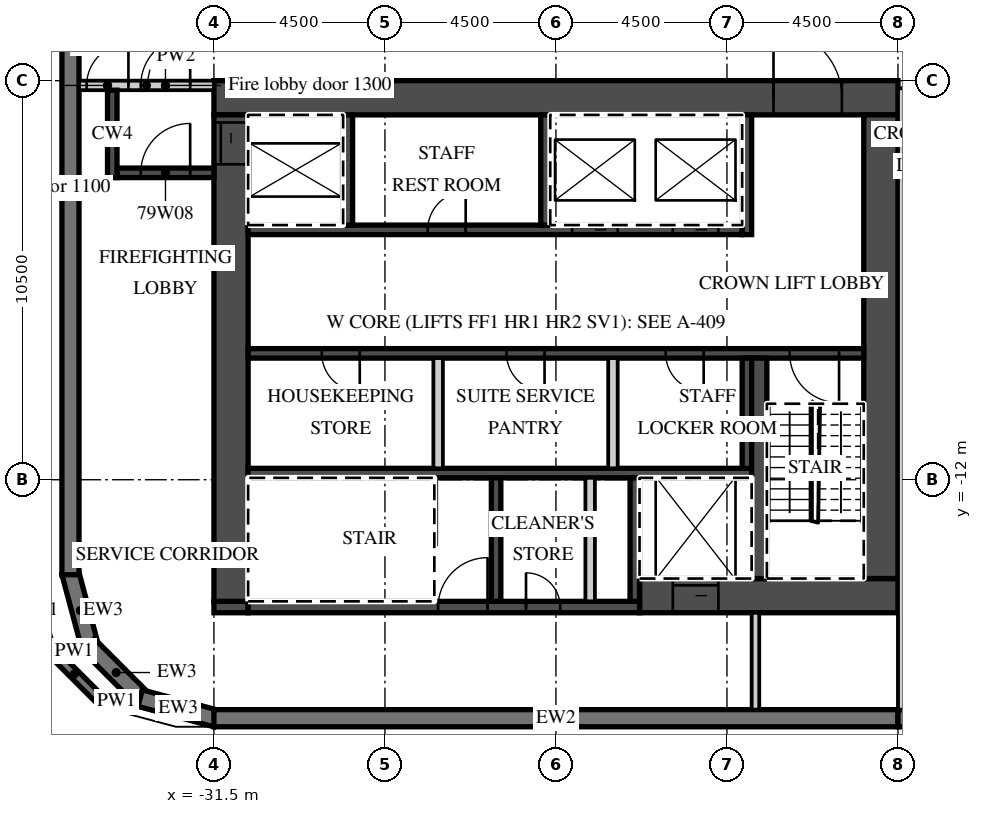
"""IFC4 building model, lengths in metres.
Left out: names, types, materials, properties, quantities, classifications, styles, units other than length and angle.
Written with IfcOpenShell. Run it as: python <this file> out.ifc"""

import sys

from ifc_helpers import new_model, si_unit, direction, frame, frame_2d, origin, place, context, subcontext, project, spatial, polyline, rectangle, outline, extrude, element, fill, save


model = new_model("IFC4")
c1 = context("Model", 3, precision=1e-05, world=origin(), true_north=direction((0.0, 1.0)))
c2 = subcontext(c1, "Body", "Model", "MODEL_VIEW")
j1 = project(units=[si_unit("LENGTHUNIT", "METRE"), si_unit("PLANEANGLEUNIT", "RADIAN")], contexts=[c1])
p1 = place(None, origin())
s1 = spatial("IfcSite", under=j1, at=p1, CompositionType="ELEMENT")
p2 = place(p1, origin())
s2 = spatial("IfcBuilding", under=s1, at=p2, CompositionType="ELEMENT")
p3 = place(p2, frame((0.0, 0.0, 313.6)))
s3 = spatial("IfcBuildingStorey", under=s2, at=p3, CompositionType="ELEMENT", Elevation=313.6)
p4 = place(p3, frame((-35.283, -14.442, 0.0), z_axis=(0.0, 0.0, 1.0), x_axis=(0.25881466832, -0.965926999034, 0.0)))
e1 = element("IfcWall", 1, at=p4, inside=s3, PredefinedType="SOLIDWALL", context=c2, shape_type="SweptSolid", body=[
    extrude(outline(polyline([(0.0, -0.225), (2.071, -0.225), (1.95, 0.225), (0.121, 0.225), (0.0, -0.225)])), origin(), (0.0, 0.0, 1.0), 3.8),
])
p5 = place(p3, frame((-34.805, -16.341, 0.0), z_axis=(0.0, 0.0, 1.0), x_axis=(0.707106781187, -0.707106781187, 0.0)))
e2 = element("IfcWall", 2, at=p5, inside=s3, PredefinedType="SOLIDWALL", context=c2, shape_type="SweptSolid", body=[
    extrude(outline(polyline([(0.0, -0.225), (2.071, -0.225), (1.95, 0.225), (0.121, 0.225), (0.0, -0.225)])), origin(), (0.0, 0.0, 1.0), 3.8),
])
p6 = place(p3, frame((-33.442, -17.747, 0.0), z_axis=(0.0, 0.0, 1.0), x_axis=(0.965926999034, -0.25881466832, 0.0)))
e3 = element("IfcWall", 3, at=p6, inside=s3, PredefinedType="SOLIDWALL", context=c2, shape_type="SweptSolid", body=[
    extrude(outline(polyline([(-0.0, -0.225), (2.07, -0.225), (1.95, 0.225), (0.12, 0.225), (-0.0, -0.225)])), origin(), (0.0, 0.0, 1.0), 3.8),
])
p7 = place(p3, frame((-31.5, -18.275, 0.0), z_axis=(0.0, 0.0, 1.0), x_axis=(1.0, 0.0, 0.0)))
e4 = element("IfcWall", 4, at=p7, inside=s3, PredefinedType="SOLIDWALL", context=c2, shape_type="SweptSolid", body=[
    extrude(rectangle(XDim=18.0, YDim=0.45, at=frame_2d((9.0, 0.0))), origin(), (0.0, 0.0, 1.0), 3.8),
])
p8 = place(p3, frame((-13.5, -18.275, 0.0), z_axis=(0.0, 0.0, 1.0), x_axis=(1.0, 0.0, 0.0)))
e5 = element("IfcWall", 5, at=p8, inside=s3, PredefinedType="SOLIDWALL", context=c2, shape_type="SweptSolid", body=[
    extrude(rectangle(XDim=46.0, YDim=0.45, at=frame_2d((23.0, 0.0))), origin(), (0.0, 0.0, 1.0), 3.8),
])
p9 = place(p3, frame((-35.275, 13.5, 0.0), z_axis=(0.0, 0.0, 1.0), x_axis=(0.0, -1.0, 0.0)))
e6 = element("IfcWall", 6, at=p9, inside=s3, PredefinedType="SOLIDWALL", context=c2, shape_type="SweptSolid", body=[
    extrude(rectangle(XDim=28.0, YDim=0.45, at=frame_2d((14.0, 0.0))), origin(), (0.0, 0.0, 1.0), 3.8),
])
p10 = place(p3, origin())
e7 = element("IfcWall", 7, at=p10, inside=s3, PredefinedType="PARAPET", context=c2, shape_type="SweptSolid", body=[
    extrude(outline(polyline([(-33.642, -17.941), (-33.647, -17.818), (-33.769, -17.697), (-34.386, -17.725), (-34.485, -17.979), (-33.642, -17.941)])), origin(), (0.0, 0.0, 1.0), 1.1),
])
p11 = place(p3, origin())
e8 = element("IfcWall", 8, at=p11, inside=s3, PredefinedType="PARAPET", context=c2, shape_type="SweptSolid", body=[
    extrude(outline(polyline([(-34.485, -17.979), (-34.386, -17.725), (-35.74, -16.371), (-35.964, -16.5), (-34.485, -17.979)])), origin(), (0.0, 0.0, 1.0), 1.1),
])
p12 = place(p3, origin())
e9 = element("IfcWall", 9, at=p12, inside=s3, PredefinedType="PARAPET", context=c2, shape_type="SweptSolid", body=[
    extrude(outline(polyline([(-35.964, -16.5), (-35.74, -16.371), (-36.25, -14.467), (-36.5, -14.5), (-35.964, -16.5)])), origin(), (0.0, 0.0, 1.0), 1.1),
])
p13 = place(p3, frame((-31.5, -1.95, 0.0), z_axis=(0.0, 0.0, 1.0), x_axis=(1.0, 0.0, 0.0)))
e10 = element("IfcWall", 10, at=p13, inside=s3, PredefinedType="SHEAR", context=c2, shape_type="SweptSolid", body=[
    extrude(rectangle(XDim=18.0, YDim=0.9, at=frame_2d((9.0, 0.0))), origin(), (0.0, 0.0, 1.0), 3.8),
])
p14 = place(p13, frame((14.725, 0.0, 0.0)))
e11 = element("IfcOpeningElement", 11, at=p14, cuts=e10, PredefinedType="OPENING", context=c2, shape_type="SweptSolid", body=[
    extrude(rectangle(XDim=1.8, YDim=2.1, at=frame_2d((0.9, 1.05))), frame((0.0, 0.46, 0.0), z_axis=(0.0, -1.0, 0.0), x_axis=(1.0, 0.0, 0.0)), (0.0, 0.0, 1.0), 0.92),
])
p15 = place(p3, frame((-20.3, -15.05, 0.0), z_axis=(0.0, 0.0, 1.0), x_axis=(1.0, 0.0, 0.0)))
e12 = element("IfcWall", 12, at=p15, inside=s3, PredefinedType="SHEAR", context=c2, shape_type="SweptSolid", body=[
    extrude(rectangle(XDim=6.8, YDim=0.9, at=frame_2d((3.4, 0.0))), origin(), (0.0, 0.0, 1.0), 3.8),
])
p16 = place(p15, frame((0.875, 0.0, 0.0)))
e13 = element("IfcOpeningElement", 13, at=p16, cuts=e12, PredefinedType="OPENING", context=c2, shape_type="SweptSolid", body=[
    extrude(rectangle(XDim=1.2, YDim=2.1, at=frame_2d((0.6, 1.05))), frame((0.0, 0.46, 0.0), z_axis=(0.0, -1.0, 0.0), x_axis=(1.0, 0.0, 0.0)), (0.0, 0.0, 1.0), 0.92),
])
p17 = place(p3, frame((-31.5, -15.35, 0.0), z_axis=(0.0, 0.0, 1.0), x_axis=(1.0, 0.0, 0.0)))
e14 = element("IfcWall", 14, at=p17, inside=s3, PredefinedType="SHEAR", context=c2, shape_type="SweptSolid", body=[
    extrude(rectangle(XDim=0.9, YDim=0.3, at=frame_2d((0.45, 0.0))), origin(), (0.0, 0.0, 1.0), 3.8),
])
p18 = place(p3, frame((-30.6, -15.35, 0.0), z_axis=(0.0, 0.0, 1.0), x_axis=(1.0, 0.0, 0.0)))
e15 = element("IfcWall", 15, at=p18, inside=s3, PredefinedType="SHEAR", context=c2, shape_type="SweptSolid", body=[
    extrude(rectangle(XDim=10.3, YDim=0.3, at=frame_2d((5.15, 0.0))), origin(), (0.0, 0.0, 1.0), 3.8),
])
p19 = place(p18, frame((5.0, 0.0, 0.0)))
e16 = element("IfcOpeningElement", 16, at=p19, cuts=e15, PredefinedType="OPENING", context=c2, shape_type="SweptSolid", body=[
    extrude(rectangle(XDim=1.3, YDim=2.1, at=frame_2d((0.65, 1.05))), frame((0.0, 0.16, 0.0), z_axis=(0.0, -1.0, 0.0), x_axis=(1.0, 0.0, 0.0)), (0.0, 0.0, 1.0), 0.32),
])
p20 = place(p18, frame((7.312, 0.0, 0.0)))
e17 = element("IfcOpeningElement", 17, at=p20, cuts=e15, PredefinedType="OPENING", context=c2, shape_type="SweptSolid", body=[
    extrude(rectangle(XDim=0.9, YDim=2.1, at=frame_2d((0.45, 1.05))), frame((0.0, 0.16, 0.0), z_axis=(0.0, -1.0, 0.0), x_axis=(1.0, 0.0, 0.0)), (0.0, 0.0, 1.0), 0.32),
])
p21 = place(p3, frame((-31.05, -15.2, 0.0), z_axis=(0.0, 0.0, 1.0), x_axis=(0.0, 1.0, 0.0)))
e18 = element("IfcWall", 18, at=p21, inside=s3, PredefinedType="SHEAR", context=c2, shape_type="SweptSolid", body=[
    extrude(rectangle(XDim=12.8, YDim=0.9, at=frame_2d((6.4, 0.0))), origin(), (0.0, 0.0, 1.0), 3.8),
])
p22 = place(p21, frame((11.5, 0.0, 0.0)))
e19 = element("IfcOpeningElement", 19, at=p22, cuts=e18, PredefinedType="OPENING", context=c2, shape_type="SweptSolid", body=[
    extrude(rectangle(XDim=1.1, YDim=2.1, at=frame_2d((0.55, 1.05))), frame((0.0, 0.46, 0.0), z_axis=(0.0, -1.0, 0.0), x_axis=(1.0, 0.0, 0.0)), (0.0, 0.0, 1.0), 0.92),
])
p23 = place(p3, frame((-13.95, -14.6, 0.0), z_axis=(0.0, 0.0, 1.0), x_axis=(0.0, 1.0, 0.0)))
e20 = element("IfcWall", 20, at=p23, inside=s3, PredefinedType="SHEAR", context=c2, shape_type="SweptSolid", body=[
    extrude(rectangle(XDim=12.2, YDim=0.9, at=frame_2d((6.1, 0.0))), origin(), (0.0, 0.0, 1.0), 3.8),
])
p24 = place(p3, frame((-30.6, -5.425, 0.0), z_axis=(0.0, 0.0, 1.0), x_axis=(1.0, 0.0, 0.0)))
e21 = element("IfcWall", 21, at=p24, inside=s3, PredefinedType="SHEAR", context=c2, shape_type="SweptSolid", body=[
    extrude(rectangle(XDim=13.0, YDim=0.25, at=frame_2d((6.5, 0.0))), origin(), (0.0, 0.0, 1.0), 3.8),
])
p25 = place(p24, frame((8.525, 0.0, 0.0)))
e22 = element("IfcOpeningElement", 22, at=p25, cuts=e21, PredefinedType="OPENING", context=c2, shape_type="SweptSolid", body=[
    extrude(rectangle(XDim=1.2, YDim=2.1, at=frame_2d((0.6, 1.05))), frame((0.0, 0.135, 0.0), z_axis=(0.0, -1.0, 0.0), x_axis=(1.0, 0.0, 0.0)), (0.0, 0.0, 1.0), 0.27),
])
p26 = place(p24, frame((11.175, 0.0, 0.0)))
e23 = element("IfcOpeningElement", 23, at=p26, cuts=e21, PredefinedType="OPENING", context=c2, shape_type="SweptSolid", body=[
    extrude(rectangle(XDim=1.2, YDim=2.1, at=frame_2d((0.6, 1.05))), frame((0.0, 0.135, 0.0), z_axis=(0.0, -1.0, 0.0), x_axis=(1.0, 0.0, 0.0)), (0.0, 0.0, 1.0), 0.27),
])
p27 = place(p24, frame((4.725, 0.0, 0.0)))
e24 = element("IfcOpeningElement", 24, at=p27, cuts=e21, PredefinedType="OPENING", context=c2, shape_type="SweptSolid", body=[
    extrude(rectangle(XDim=1.0, YDim=2.1, at=frame_2d((0.5, 1.05))), frame((0.0, 0.135, 0.0), z_axis=(0.0, -1.0, 0.0), x_axis=(1.0, 0.0, 0.0)), (0.0, 0.0, 1.0), 0.27),
])
p28 = place(p3, frame((-17.475, -5.55, 0.0), z_axis=(0.0, 0.0, 1.0), x_axis=(0.0, 1.0, 0.0)))
e25 = element("IfcWall", 25, at=p28, inside=s3, PredefinedType="SHEAR", context=c2, shape_type="SweptSolid", body=[
    extrude(rectangle(XDim=3.15, YDim=0.25, at=frame_2d((1.575, 0.0))), origin(), (0.0, 0.0, 1.0), 3.8),
])
for number, where, z_axis, x_axis in (
    (26, (-27.975, -5.3, 0.0), (0.0, 0.0, 1.0), (0.0, 1.0, 0.0)),
    (27, (-22.775, -5.3, 0.0), (0.0, 0.0, 1.0), (0.0, 1.0, 0.0)),
):
    element("IfcWall", number, at=place(p3, frame(where, z_axis=z_axis, x_axis=x_axis)), inside=s3, PredefinedType="SHEAR", context=c2, shape_type="SweptSolid", body=[
        extrude(rectangle(XDim=2.9, YDim=0.25, at=frame_2d((1.45, 0.0))), origin(), (0.0, 0.0, 1.0), 3.8),
    ])
p29 = place(p3, frame((-30.6, -8.675, 0.0), z_axis=(0.0, 0.0, 1.0), x_axis=(1.0, 0.0, 0.0)))
e28 = element("IfcWall", 28, at=p29, inside=s3, PredefinedType="SHEAR", context=c2, shape_type="SweptSolid", body=[
    extrude(rectangle(XDim=16.2, YDim=0.25, at=frame_2d((8.1, 0.0))), origin(), (0.0, 0.0, 1.0), 3.8),
])
p30 = place(p29, frame((14.25, 0.0, 0.0)))
e29 = element("IfcOpeningElement", 29, at=p30, cuts=e28, PredefinedType="OPENING", context=c2, shape_type="SweptSolid", body=[
    extrude(rectangle(XDim=1.3, YDim=2.1, at=frame_2d((0.65, 1.05))), frame((0.0, 0.135, 0.0), z_axis=(0.0, -1.0, 0.0), x_axis=(1.0, 0.0, 0.0)), (0.0, 0.0, 1.0), 0.27),
])
p31 = place(p29, frame((1.938, 0.0, 0.0)))
e30 = element("IfcOpeningElement", 30, at=p31, cuts=e28, PredefinedType="OPENING", context=c2, shape_type="SweptSolid", body=[
    extrude(rectangle(XDim=1.0, YDim=2.1, at=frame_2d((0.5, 1.05))), frame((0.0, 0.135, 0.0), z_axis=(0.0, -1.0, 0.0), x_axis=(1.0, 0.0, 0.0)), (0.0, 0.0, 1.0), 0.27),
])
p32 = place(p29, frame((6.8, 0.0, 0.0)))
e31 = element("IfcOpeningElement", 31, at=p32, cuts=e28, PredefinedType="OPENING", context=c2, shape_type="SweptSolid", body=[
    extrude(rectangle(XDim=1.0, YDim=2.1, at=frame_2d((0.5, 1.05))), frame((0.0, 0.135, 0.0), z_axis=(0.0, -1.0, 0.0), x_axis=(1.0, 0.0, 0.0)), (0.0, 0.0, 1.0), 0.27),
])
p33 = place(p29, frame((10.988, 0.0, 0.0)))
e32 = element("IfcOpeningElement", 32, at=p33, cuts=e28, PredefinedType="OPENING", context=c2, shape_type="SweptSolid", body=[
    extrude(rectangle(XDim=1.0, YDim=2.1, at=frame_2d((0.5, 1.05))), frame((0.0, 0.135, 0.0), z_axis=(0.0, -1.0, 0.0), x_axis=(1.0, 0.0, 0.0)), (0.0, 0.0, 1.0), 0.27),
])
p34 = place(p3, frame((-30.6, -11.825, 0.0), z_axis=(0.0, 0.0, 1.0), x_axis=(1.0, 0.0, 0.0)))
e33 = element("IfcWall", 33, at=p34, inside=s3, PredefinedType="SHEAR", context=c2, shape_type="SweptSolid", body=[
    extrude(rectangle(XDim=13.25, YDim=0.25, at=frame_2d((6.625, 0.0))), origin(), (0.0, 0.0, 1.0), 3.8),
])
p35 = place(p3, frame((-17.475, -11.7, 0.0), z_axis=(0.0, 0.0, 1.0), x_axis=(0.0, 1.0, 0.0)))
e34 = element("IfcWall", 34, at=p35, inside=s3, PredefinedType="SHEAR", context=c2, shape_type="SweptSolid", body=[
    extrude(rectangle(XDim=2.9, YDim=0.25, at=frame_2d((1.45, 0.0))), origin(), (0.0, 0.0, 1.0), 3.8),
])
for number, where, z_axis, x_axis in (
    (35, (-25.6, -11.7, 0.0), (0.0, 0.0, 1.0), (0.0, 1.0, 0.0)),
    (36, (-21.0, -11.7, 0.0), (0.0, 0.0, 1.0), (0.0, 1.0, 0.0)),
):
    element("IfcWall", number, at=place(p3, frame(where, z_axis=z_axis, x_axis=x_axis)), inside=s3, PredefinedType="PARTITIONING", context=c2, shape_type="SweptSolid", body=[
        extrude(rectangle(XDim=2.9, YDim=0.25, at=frame_2d((1.45, 0.0))), origin(), (0.0, 0.0, 1.0), 3.8),
    ])
p36 = place(p3, frame((-17.15, -14.6, 0.0), z_axis=(0.0, 0.0, 1.0), x_axis=(0.0, 1.0, 0.0)))
e37 = element("IfcWall", 37, at=p36, inside=s3, PredefinedType="SHEAR", context=c2, shape_type="SweptSolid", body=[
    extrude(rectangle(XDim=5.8, YDim=0.4, at=frame_2d((2.9, 0.0))), origin(), (0.0, 0.0, 1.0), 3.8),
])
for number, where, z_axis, x_axis in (
    (38, (-20.425, -15.2, 0.0), (0.0, 0.0, 1.0), (0.0, 1.0, 0.0)),
    (39, (-24.075, -15.2, 0.0), (0.0, 0.0, 1.0), (0.0, 1.0, 0.0)),
):
    element("IfcWall", number, at=place(p3, frame(where, z_axis=z_axis, x_axis=x_axis)), inside=s3, PredefinedType="SHEAR", context=c2, shape_type="SweptSolid", body=[
        extrude(rectangle(XDim=3.25, YDim=0.25, at=frame_2d((1.625, 0.0))), origin(), (0.0, 0.0, 1.0), 3.8),
    ])
p37 = place(p3, frame((-21.6, -15.2, 0.0), z_axis=(0.0, 0.0, 1.0), x_axis=(0.0, 1.0, 0.0)))
e40 = element("IfcWall", 40, at=p37, inside=s3, PredefinedType="PARTITIONING", context=c2, shape_type="SweptSolid", body=[
    extrude(rectangle(XDim=3.25, YDim=0.25, at=frame_2d((1.625, 0.0))), origin(), (0.0, 0.0, 1.0), 3.8),
])
p38 = place(p3, frame((-35.05, -1.625, 0.0), z_axis=(0.0, 0.0, 1.0), x_axis=(1.0, 0.0, 0.0)))
e41 = element("IfcWall", 41, at=p38, inside=s3, PredefinedType="PARTITIONING", context=c2, shape_type="SweptSolid", body=[
    extrude(rectangle(XDim=3.55, YDim=0.25, at=frame_2d((1.775, 0.0))), origin(), (0.0, 0.0, 1.0), 3.8),
])
p39 = place(p38, frame((1.625, 0.0, 0.0)))
e42 = element("IfcOpeningElement", 42, at=p39, cuts=e41, PredefinedType="OPENING", context=c2, shape_type="SweptSolid", body=[
    extrude(rectangle(XDim=1.3, YDim=2.1, at=frame_2d((0.65, 1.05))), frame((0.0, 0.135, 0.0), z_axis=(0.0, -1.0, 0.0), x_axis=(1.0, 0.0, 0.0)), (0.0, 0.0, 1.0), 0.27),
])
p40 = place(p38, frame((0.2, 0.0, 0.0)))
e43 = element("IfcOpeningElement", 43, at=p40, cuts=e41, PredefinedType="OPENING", context=c2, shape_type="SweptSolid", body=[
    extrude(rectangle(XDim=1.1, YDim=2.1, at=frame_2d((0.55, 1.05))), frame((0.0, 0.135, 0.0), z_axis=(0.0, -1.0, 0.0), x_axis=(1.0, 0.0, 0.0)), (0.0, 0.0, 1.0), 0.27),
])
p41 = place(p3, frame((-34.05, -3.925, 0.0), z_axis=(0.0, 0.0, 1.0), x_axis=(1.0, 0.0, 0.0)))
e44 = element("IfcWall", 44, at=p41, inside=s3, PredefinedType="SHEAR", context=c2, shape_type="SweptSolid", body=[
    extrude(rectangle(XDim=2.55, YDim=0.25, at=frame_2d((1.275, 0.0))), origin(), (0.0, 0.0, 1.0), 3.8),
])
p42 = place(p41, frame((0.625, 0.0, 0.0)))
e45 = element("IfcOpeningElement", 45, at=p42, cuts=e44, PredefinedType="OPENING", context=c2, shape_type="SweptSolid", body=[
    extrude(rectangle(XDim=1.3, YDim=2.1, at=frame_2d((0.65, 1.05))), frame((0.0, 0.135, 0.0), z_axis=(0.0, -1.0, 0.0), x_axis=(1.0, 0.0, 0.0)), (0.0, 0.0, 1.0), 0.27),
])
p43 = place(p3, frame((-34.175, -4.05, 0.0), z_axis=(0.0, 0.0, 1.0), x_axis=(0.0, 1.0, 0.0)))
e46 = element("IfcWall", 46, at=p43, inside=s3, PredefinedType="SHEAR", context=c2, shape_type="SweptSolid", body=[
    extrude(rectangle(XDim=2.3, YDim=0.25, at=frame_2d((1.15, 0.0))), origin(), (0.0, 0.0, 1.0), 3.8),
])
p44 = place(p3, frame((-17.25, -18.05, 0.0), z_axis=(0.0, 0.0, 1.0), x_axis=(0.0, 1.0, 0.0)))
e47 = element("IfcWall", 47, at=p44, inside=s3, PredefinedType="PARTITIONING", context=c2, shape_type="SweptSolid", body=[
    extrude(rectangle(XDim=2.55, YDim=0.2, at=frame_2d((1.275, 0.0))), origin(), (0.0, 0.0, 1.0), 3.8),
])
p45 = place(p3, frame((-13.4, -18.05, 0.0), z_axis=(0.0, 0.0, 1.0), x_axis=(0.0, 1.0, 0.0)))
e48 = element("IfcWall", 48, at=p45, inside=s3, PredefinedType="PARTITIONING", context=c2, shape_type="SweptSolid", body=[
    extrude(rectangle(XDim=16.35, YDim=0.2, at=frame_2d((8.175, 0.0))), origin(), (0.0, 0.0, 1.0), 3.8),
])
p46 = place(p25, origin())
e49 = element("IfcDoor", 49, at=p46, inside=s3, OperationType="SLIDING_TO_LEFT", PredefinedType="DOOR", context=c2, shape_type="SweptSolid", body=[
    extrude(rectangle(XDim=1.2, YDim=2.1, at=frame_2d((0.6, 1.05))), frame((0.0, 0.025, 0.0), z_axis=(0.0, -1.0, 0.0), x_axis=(1.0, 0.0, 0.0)), (0.0, 0.0, 1.0), 0.05),
])
fill(e22, e49)
p47 = place(p26, origin())
e50 = element("IfcDoor", 50, at=p47, inside=s3, OperationType="SLIDING_TO_RIGHT", PredefinedType="DOOR", context=c2, shape_type="SweptSolid", body=[
    extrude(rectangle(XDim=1.2, YDim=2.1, at=frame_2d((0.6, 1.05))), frame((0.0, 0.025, 0.0), z_axis=(0.0, -1.0, 0.0), x_axis=(1.0, 0.0, 0.0)), (0.0, 0.0, 1.0), 0.05),
])
fill(e23, e50)
p48 = place(p16, origin())
e51 = element("IfcDoor", 51, at=p48, inside=s3, OperationType="SLIDING_TO_LEFT", PredefinedType="DOOR", context=c2, shape_type="SweptSolid", body=[
    extrude(rectangle(XDim=1.2, YDim=2.1, at=frame_2d((0.6, 1.05))), frame((0.0, 0.025, 0.0), z_axis=(0.0, -1.0, 0.0), x_axis=(1.0, 0.0, 0.0)), (0.0, 0.0, 1.0), 0.05),
])
fill(e13, e51)
p49 = place(p22, origin())
e52 = element("IfcDoor", 52, at=p49, inside=s3, OperationType="SLIDING_TO_RIGHT", PredefinedType="DOOR", context=c2, shape_type="SweptSolid", body=[
    extrude(rectangle(XDim=1.1, YDim=2.1, at=frame_2d((0.55, 1.05))), frame((0.0, 0.025, 0.0), z_axis=(0.0, -1.0, 0.0), x_axis=(1.0, 0.0, 0.0)), (0.0, 0.0, 1.0), 0.05),
])
fill(e19, e52)
p50 = place(p14, origin())
e53 = element("IfcDoor", 53, at=p50, inside=s3, OperationType="DOUBLE_DOOR_DOUBLE_SWING", PredefinedType="DOOR", context=c2, shape_type="SweptSolid", body=[
    extrude(rectangle(XDim=1.8, YDim=2.1, at=frame_2d((0.9, 1.05))), frame((0.0, 0.025, 0.0), z_axis=(0.0, -1.0, 0.0), x_axis=(1.0, 0.0, 0.0)), (0.0, 0.0, 1.0), 0.05),
])
fill(e11, e53)
p51 = place(p39, origin())
e54 = element("IfcDoor", 54, at=p51, inside=s3, OperationType="SINGLE_SWING_RIGHT", PredefinedType="DOOR", context=c2, shape_type="SweptSolid", body=[
    extrude(rectangle(XDim=1.3, YDim=2.1, at=frame_2d((0.65, 1.05))), frame((0.0, 0.025, 0.0), z_axis=(0.0, -1.0, 0.0), x_axis=(1.0, 0.0, 0.0)), (0.0, 0.0, 1.0), 0.05),
])
fill(e42, e54)
p52 = place(p42, origin())
e55 = element("IfcDoor", 55, at=p52, inside=s3, OperationType="SINGLE_SWING_RIGHT", PredefinedType="DOOR", context=c2, shape_type="SweptSolid", body=[
    extrude(rectangle(XDim=1.3, YDim=2.1, at=frame_2d((0.65, 1.05))), frame((0.0, 0.025, 0.0), z_axis=(0.0, -1.0, 0.0), x_axis=(1.0, 0.0, 0.0)), (0.0, 0.0, 1.0), 0.05),
])
fill(e45, e55)
p53 = place(p40, origin())
e56 = element("IfcDoor", 56, at=p53, inside=s3, OperationType="SINGLE_SWING_RIGHT", PredefinedType="DOOR", context=c2, shape_type="SweptSolid", body=[
    extrude(rectangle(XDim=1.1, YDim=2.1, at=frame_2d((0.55, 1.05))), frame((0.0, 0.025, 0.0), z_axis=(0.0, -1.0, 0.0), x_axis=(1.0, 0.0, 0.0)), (0.0, 0.0, 1.0), 0.05),
])
fill(e43, e56)
p54 = place(p30, origin())
e57 = element("IfcDoor", 57, at=p54, inside=s3, OperationType="SINGLE_SWING_RIGHT", PredefinedType="DOOR", context=c2, shape_type="SweptSolid", body=[
    extrude(rectangle(XDim=1.3, YDim=2.1, at=frame_2d((0.65, 1.05))), frame((0.0, 0.025, 0.0), z_axis=(0.0, -1.0, 0.0), x_axis=(1.0, 0.0, 0.0)), (0.0, 0.0, 1.0), 0.05),
])
fill(e29, e57)
p55 = place(p19, origin())
e58 = element("IfcDoor", 58, at=p55, inside=s3, OperationType="SINGLE_SWING_RIGHT", PredefinedType="DOOR", context=c2, shape_type="SweptSolid", body=[
    extrude(rectangle(XDim=1.3, YDim=2.1, at=frame_2d((0.65, 1.05))), frame((0.0, 0.025, 0.0), z_axis=(0.0, -1.0, 0.0), x_axis=(1.0, 0.0, 0.0)), (0.0, 0.0, 1.0), 0.05),
])
fill(e16, e58)
p56 = place(p20, origin())
e59 = element("IfcDoor", 59, at=p56, inside=s3, OperationType="SINGLE_SWING_LEFT", PredefinedType="DOOR", context=c2, shape_type="SweptSolid", body=[
    extrude(rectangle(XDim=0.9, YDim=2.1, at=frame_2d((0.45, 1.05))), frame((0.0, 0.025, 0.0), z_axis=(0.0, -1.0, 0.0), x_axis=(1.0, 0.0, 0.0)), (0.0, 0.0, 1.0), 0.05),
])
fill(e17, e59)
p57 = place(p31, origin())
e60 = element("IfcDoor", 60, at=p57, inside=s3, OperationType="SINGLE_SWING_RIGHT", PredefinedType="DOOR", context=c2, shape_type="SweptSolid", body=[
    extrude(rectangle(XDim=1.0, YDim=2.1, at=frame_2d((0.5, 1.05))), frame((0.0, 0.025, 0.0), z_axis=(0.0, -1.0, 0.0), x_axis=(1.0, 0.0, 0.0)), (0.0, 0.0, 1.0), 0.05),
])
fill(e30, e60)
p58 = place(p32, origin())
e61 = element("IfcDoor", 61, at=p58, inside=s3, OperationType="SINGLE_SWING_RIGHT", PredefinedType="DOOR", context=c2, shape_type="SweptSolid", body=[
    extrude(rectangle(XDim=1.0, YDim=2.1, at=frame_2d((0.5, 1.05))), frame((0.0, 0.025, 0.0), z_axis=(0.0, -1.0, 0.0), x_axis=(1.0, 0.0, 0.0)), (0.0, 0.0, 1.0), 0.05),
])
fill(e31, e61)
p59 = place(p33, origin())
e62 = element("IfcDoor", 62, at=p59, inside=s3, OperationType="SINGLE_SWING_RIGHT", PredefinedType="DOOR", context=c2, shape_type="SweptSolid", body=[
    extrude(rectangle(XDim=1.0, YDim=2.1, at=frame_2d((0.5, 1.05))), frame((0.0, 0.025, 0.0), z_axis=(0.0, -1.0, 0.0), x_axis=(1.0, 0.0, 0.0)), (0.0, 0.0, 1.0), 0.05),
])
fill(e32, e62)
p60 = place(p27, origin())
e63 = element("IfcDoor", 63, at=p60, inside=s3, OperationType="SINGLE_SWING_RIGHT", PredefinedType="DOOR", context=c2, shape_type="SweptSolid", body=[
    extrude(rectangle(XDim=1.0, YDim=2.1, at=frame_2d((0.5, 1.05))), frame((0.0, 0.025, 0.0), z_axis=(0.0, -1.0, 0.0), x_axis=(1.0, 0.0, 0.0)), (0.0, 0.0, 1.0), 0.05),
])
fill(e24, e63)
save(model, sys.argv[1])
